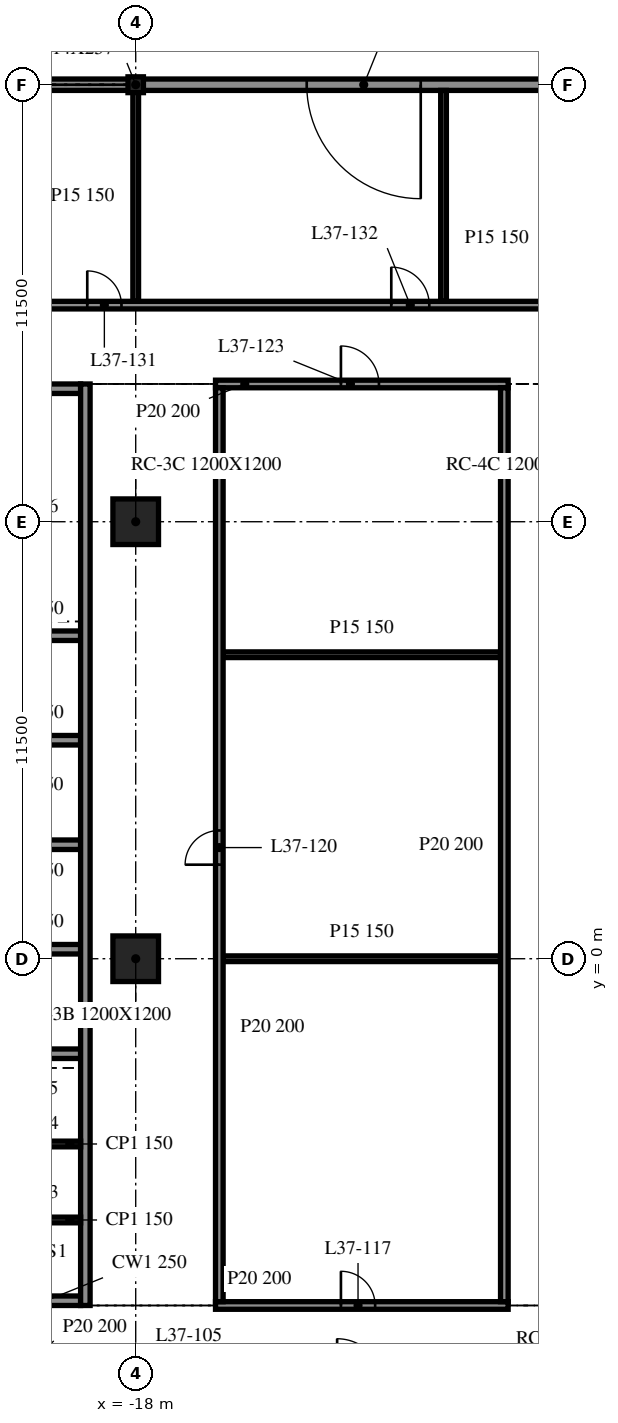
"""IFC4 building model, lengths in metres.
Left out: names, types, materials, properties, quantities, classifications, styles, units other than length and angle.
Written with IfcOpenShell. Run it as: python <this file> out.ifc"""

import sys

from ifc_helpers import new_model, si_unit, direction, frame, frame_2d, origin, origin_2d, place, context, subcontext, project, spatial, rectangle, i_section, extrude, element, fill, save


model = new_model("IFC4")
c1 = context("Model", 3, precision=1e-05, world=origin(), true_north=direction((0.0, 1.0)))
c2 = subcontext(c1, "Body", "Model", "MODEL_VIEW")
j1 = project(units=[si_unit("LENGTHUNIT", "METRE"), si_unit("PLANEANGLEUNIT", "RADIAN")], contexts=[c1])
p1 = place(None, origin())
s1 = spatial("IfcSite", under=j1, at=p1, CompositionType="ELEMENT")
p2 = place(p1, origin())
s2 = spatial("IfcBuilding", under=s1, at=p2, CompositionType="ELEMENT")
p3 = place(p2, frame((0.0, 0.0, 159.2)))
s3 = spatial("IfcBuildingStorey", under=s2, at=p3, CompositionType="ELEMENT", Elevation=159.2)
for number, where, z_axis, x_axis in (
    (1, (-18.0, 0.0, -0.34), (0.0, 0.0, 1.0), (1.0, 0.0, 0.0)),
    (2, (-18.0, 11.5, -0.34), (0.0, 0.0, 1.0), (1.0, 0.0, 0.0)),
):
    element("IfcColumn", number, at=place(p3, frame(where, z_axis=z_axis, x_axis=x_axis)), inside=s3, PredefinedType="COLUMN", context=c2, shape_type="SweptSolid", body=[
        extrude(rectangle(XDim=1.2, YDim=1.2, at=origin_2d()), origin(), (0.0, 0.0, 1.0), 3.8),
    ])
p4 = place(p3, frame((-18.0, 23.0, -0.34), z_axis=(0.0, 0.0, 1.0), x_axis=(1.0, 0.0, 0.0)))
e3 = element("IfcColumn", 3, at=p4, inside=s3, PredefinedType="COLUMN", context=c2, shape_type="SweptSolid", body=[
    extrude(i_section(OverallWidth=0.406, OverallDepth=0.417, WebThickness=0.03, FlangeThickness=0.048, at=origin_2d()), origin(), (0.0, 0.0, 1.0), 3.8),
])
p5 = place(p3, frame((-6.015, 23.0, 0.0), z_axis=(0.0, 0.0, 1.0), x_axis=(-1.0, 0.0, 0.0)))
e4 = element("IfcWall", 4, at=p5, inside=s3, PredefinedType="NOTDEFINED", context=c2, shape_type="SweptSolid", body=[
    extrude(rectangle(XDim=11.97, YDim=0.3, at=frame_2d((5.985, 0.0))), origin(), (0.0, 0.0, 1.0), 2.782),
])
p6 = place(p5, frame((4.485, 0.0, 0.0)))
e5 = element("IfcOpeningElement", 5, at=p6, cuts=e4, PredefinedType="OPENING", context=c2, shape_type="SweptSolid", body=[
    extrude(rectangle(XDim=3.0, YDim=2.4, at=frame_2d((1.5, 1.2))), frame((0.0, 0.16, 0.0), z_axis=(0.0, -1.0, 0.0), x_axis=(1.0, 0.0, 0.0)), (0.0, 0.0, 1.0), 0.32),
])
p7 = place(p3, frame((-18.015, 23.0, 0.0), z_axis=(0.0, 0.0, 1.0), x_axis=(-1.0, 0.0, 0.0)))
e6 = element("IfcWall", 6, at=p7, inside=s3, PredefinedType="NOTDEFINED", context=c2, shape_type="SweptSolid", body=[
    extrude(rectangle(XDim=11.97, YDim=0.3, at=frame_2d((5.985, 0.0))), origin(), (0.0, 0.0, 1.0), 2.782),
])
p8 = place(p3, frame((-19.325, -9.125, 0.0), z_axis=(0.0, 0.0, 1.0), x_axis=(0.0, 1.0, 0.0)))
e7 = element("IfcWall", 7, at=p8, inside=s3, PredefinedType="SOLIDWALL", context=c2, shape_type="SweptSolid", body=[
    extrude(rectangle(XDim=24.25, YDim=0.25, at=frame_2d((12.125, 0.0))), origin(), (0.0, 0.0, 1.0), 3.46),
])
p9 = place(p3, frame((-19.45, -9.0, 0.0), z_axis=(0.0, 0.0, 1.0), x_axis=(-1.0, 0.0, 0.0)))
e8 = element("IfcWall", 8, at=p9, inside=s3, PredefinedType="SOLIDWALL", context=c2, shape_type="SweptSolid", body=[
    extrude(rectangle(XDim=9.1, YDim=0.25, at=frame_2d((4.55, 0.0))), origin(), (0.0, 0.0, 1.0), 3.46),
])
p10 = place(p9, frame((3.65, 0.0, 0.0)))
e9 = element("IfcOpeningElement", 9, at=p10, cuts=e8, PredefinedType="OPENING", context=c2, shape_type="SweptSolid", body=[
    extrude(rectangle(XDim=1.8, YDim=2.1, at=frame_2d((0.9, 1.05))), frame((0.0, 0.135, 0.0), z_axis=(0.0, -1.0, 0.0), x_axis=(1.0, 0.0, 0.0)), (0.0, 0.0, 1.0), 0.27),
])
p11 = place(p3, frame((-28.55, 15.0, 0.0), z_axis=(0.0, 0.0, 1.0), x_axis=(1.0, 0.0, 0.0)))
e10 = element("IfcWall", 10, at=p11, inside=s3, PredefinedType="SOLIDWALL", context=c2, shape_type="SweptSolid", body=[
    extrude(rectangle(XDim=9.1, YDim=0.25, at=frame_2d((4.55, 0.0))), origin(), (0.0, 0.0, 1.0), 3.46),
])
p12 = place(p11, frame((3.65, 0.0, 0.0)))
e11 = element("IfcOpeningElement", 11, at=p12, cuts=e10, PredefinedType="OPENING", context=c2, shape_type="SweptSolid", body=[
    extrude(rectangle(XDim=1.8, YDim=2.1, at=frame_2d((0.9, 1.05))), frame((0.0, 0.135, 0.0), z_axis=(0.0, -1.0, 0.0), x_axis=(1.0, 0.0, 0.0)), (0.0, 0.0, 1.0), 0.27),
])
for number, where, z_axis, x_axis in (
    (12, (-22.3, -2.5, 0.0), (0.0, 0.0, 1.0), (1.0, 0.0, 0.0)),
    (13, (-22.3, 0.25, 0.0), (0.0, 0.0, 1.0), (1.0, 0.0, 0.0)),
    (14, (-22.3, 3.0, 0.0), (0.0, 0.0, 1.0), (1.0, 0.0, 0.0)),
    (15, (-22.3, 5.75, 0.0), (0.0, 0.0, 1.0), (1.0, 0.0, 0.0)),
    (16, (-22.3, 8.5, 0.0), (0.0, 0.0, 1.0), (1.0, 0.0, 0.0)),
):
    element("IfcWall", number, at=place(p3, frame(where, z_axis=z_axis, x_axis=x_axis)), inside=s3, PredefinedType="SOLIDWALL", context=c2, shape_type="SweptSolid", body=[
        extrude(rectangle(XDim=2.85, YDim=0.25, at=frame_2d((1.425, 0.0))), origin(), (0.0, 0.0, 1.0), 3.46),
    ])
for number, where, z_axis, x_axis in (
    (17, (-22.3, -6.875, 0.0), (0.0, 0.0, 1.0), (1.0, 0.0, 0.0)),
    (18, (-22.3, -4.875, 0.0), (0.0, 0.0, 1.0), (1.0, 0.0, 0.0)),
):
    element("IfcWall", number, at=place(p3, frame(where, z_axis=z_axis, x_axis=x_axis)), inside=s3, PredefinedType="PARTITIONING", context=c2, shape_type="SweptSolid", body=[
        extrude(rectangle(XDim=2.85, YDim=0.15, at=frame_2d((1.425, 0.0))), origin(), (0.0, 0.0, 1.0), 3.46),
    ])
p13 = place(p3, frame((-15.9, -9.125, 0.0), z_axis=(0.0, 0.0, 1.0), x_axis=(1.0, 0.0, 0.0)))
e19 = element("IfcWall", 19, at=p13, inside=s3, PredefinedType="PARTITIONING", context=c2, shape_type="SweptSolid", body=[
    extrude(rectangle(XDim=7.7, YDim=0.2, at=frame_2d((3.85, 0.0))), origin(), (0.0, 0.0, 1.0), 3.46),
])
p14 = place(p13, frame((3.3, 0.0, 0.0)))
e20 = element("IfcOpeningElement", 20, at=p14, cuts=e19, PredefinedType="OPENING", context=c2, shape_type="SweptSolid", body=[
    extrude(rectangle(XDim=0.9, YDim=2.1, at=frame_2d((0.45, 1.05))), frame((0.0, 0.11, 0.0), z_axis=(0.0, -1.0, 0.0), x_axis=(1.0, 0.0, 0.0)), (0.0, 0.0, 1.0), 0.22),
])
for number, where, z_axis, x_axis in (
    (21, (-15.7, 0.0, 0.0), (0.0, 0.0, 1.0), (1.0, 0.0, 0.0)),
    (22, (-15.7, 8.0, 0.0), (0.0, 0.0, 1.0), (1.0, 0.0, 0.0)),
):
    element("IfcWall", number, at=place(p3, frame(where, z_axis=z_axis, x_axis=x_axis)), inside=s3, PredefinedType="PARTITIONING", context=c2, shape_type="SweptSolid", body=[
        extrude(rectangle(XDim=7.3, YDim=0.15, at=frame_2d((3.65, 0.0))), origin(), (0.0, 0.0, 1.0), 3.46),
    ])
p15 = place(p3, frame((-15.9, 15.125, 0.0), z_axis=(0.0, 0.0, 1.0), x_axis=(1.0, 0.0, 0.0)))
e23 = element("IfcWall", 23, at=p15, inside=s3, PredefinedType="PARTITIONING", context=c2, shape_type="SweptSolid", body=[
    extrude(rectangle(XDim=7.7, YDim=0.2, at=frame_2d((3.85, 0.0))), origin(), (0.0, 0.0, 1.0), 3.46),
])
p16 = place(p15, frame((3.3, 0.0, 0.0)))
e24 = element("IfcOpeningElement", 24, at=p16, cuts=e23, PredefinedType="OPENING", context=c2, shape_type="SweptSolid", body=[
    extrude(rectangle(XDim=1.0, YDim=2.1, at=frame_2d((0.5, 1.05))), frame((0.0, 0.11, 0.0), z_axis=(0.0, -1.0, 0.0), x_axis=(1.0, 0.0, 0.0)), (0.0, 0.0, 1.0), 0.22),
])
p17 = place(p3, frame((-47.975, 17.2, 0.0), z_axis=(0.0, 0.0, 1.0), x_axis=(1.0, 0.0, 0.0)))
e25 = element("IfcWall", 25, at=p17, inside=s3, PredefinedType="PARTITIONING", context=c2, shape_type="SweptSolid", body=[
    extrude(rectangle(XDim=95.95, YDim=0.2, at=frame_2d((47.975, 0.0))), origin(), (0.0, 0.0, 1.0), 3.46),
])
p18 = place(p17, frame((4.5, 0.0, 0.0)))
e26 = element("IfcOpeningElement", 26, at=p18, cuts=e25, PredefinedType="OPENING", context=c2, shape_type="SweptSolid", body=[
    extrude(rectangle(XDim=1.0, YDim=2.1, at=frame_2d((0.5, 1.05))), frame((0.0, 0.11, 0.0), z_axis=(0.0, -1.0, 0.0), x_axis=(1.0, 0.0, 0.0)), (0.0, 0.0, 1.0), 0.22),
])
p19 = place(p17, frame((10.5, 0.0, 0.0)))
e27 = element("IfcOpeningElement", 27, at=p19, cuts=e25, PredefinedType="OPENING", context=c2, shape_type="SweptSolid", body=[
    extrude(rectangle(XDim=1.0, YDim=2.1, at=frame_2d((0.5, 1.05))), frame((0.0, 0.11, 0.0), z_axis=(0.0, -1.0, 0.0), x_axis=(1.0, 0.0, 0.0)), (0.0, 0.0, 1.0), 0.22),
])
p20 = place(p17, frame((22.7, 0.0, 0.0)))
e28 = element("IfcOpeningElement", 28, at=p20, cuts=e25, PredefinedType="OPENING", context=c2, shape_type="SweptSolid", body=[
    extrude(rectangle(XDim=0.9, YDim=2.1, at=frame_2d((0.45, 1.05))), frame((0.0, 0.11, 0.0), z_axis=(0.0, -1.0, 0.0), x_axis=(1.0, 0.0, 0.0)), (0.0, 0.0, 1.0), 0.22),
])
p21 = place(p17, frame((25.7, 0.0, 0.0)))
e29 = element("IfcOpeningElement", 29, at=p21, cuts=e25, PredefinedType="OPENING", context=c2, shape_type="SweptSolid", body=[
    extrude(rectangle(XDim=1.2, YDim=2.1, at=frame_2d((0.6, 1.05))), frame((0.0, 0.11, 0.0), z_axis=(0.0, -1.0, 0.0), x_axis=(1.0, 0.0, 0.0)), (0.0, 0.0, 1.0), 0.22),
])
p22 = place(p17, frame((28.7, 0.0, 0.0)))
e30 = element("IfcOpeningElement", 30, at=p22, cuts=e25, PredefinedType="OPENING", context=c2, shape_type="SweptSolid", body=[
    extrude(rectangle(XDim=0.9, YDim=2.1, at=frame_2d((0.45, 1.05))), frame((0.0, 0.11, 0.0), z_axis=(0.0, -1.0, 0.0), x_axis=(1.0, 0.0, 0.0)), (0.0, 0.0, 1.0), 0.22),
])
p23 = place(p17, frame((36.7, 0.0, 0.0)))
e31 = element("IfcOpeningElement", 31, at=p23, cuts=e25, PredefinedType="OPENING", context=c2, shape_type="SweptSolid", body=[
    extrude(rectangle(XDim=1.0, YDim=2.1, at=frame_2d((0.5, 1.05))), frame((0.0, 0.11, 0.0), z_axis=(0.0, -1.0, 0.0), x_axis=(1.0, 0.0, 0.0)), (0.0, 0.0, 1.0), 0.22),
])
p24 = place(p17, frame((46.5, 0.0, 0.0)))
e32 = element("IfcOpeningElement", 32, at=p24, cuts=e25, PredefinedType="OPENING", context=c2, shape_type="SweptSolid", body=[
    extrude(rectangle(XDim=1.0, YDim=2.1, at=frame_2d((0.5, 1.05))), frame((0.0, 0.11, 0.0), z_axis=(0.0, -1.0, 0.0), x_axis=(1.0, 0.0, 0.0)), (0.0, 0.0, 1.0), 0.22),
])
p25 = place(p17, frame((48.1, 0.0, 0.0)))
e33 = element("IfcOpeningElement", 33, at=p25, cuts=e25, PredefinedType="OPENING", context=c2, shape_type="SweptSolid", body=[
    extrude(rectangle(XDim=0.9, YDim=2.1, at=frame_2d((0.45, 1.05))), frame((0.0, 0.11, 0.0), z_axis=(0.0, -1.0, 0.0), x_axis=(1.0, 0.0, 0.0)), (0.0, 0.0, 1.0), 0.22),
])
p26 = place(p17, frame((51.5, 0.0, 0.0)))
e34 = element("IfcOpeningElement", 34, at=p26, cuts=e25, PredefinedType="OPENING", context=c2, shape_type="SweptSolid", body=[
    extrude(rectangle(XDim=1.2, YDim=2.1, at=frame_2d((0.6, 1.05))), frame((0.0, 0.11, 0.0), z_axis=(0.0, -1.0, 0.0), x_axis=(1.0, 0.0, 0.0)), (0.0, 0.0, 1.0), 0.22),
])
p27 = place(p17, frame((54.1, 0.0, 0.0)))
e35 = element("IfcOpeningElement", 35, at=p27, cuts=e25, PredefinedType="OPENING", context=c2, shape_type="SweptSolid", body=[
    extrude(rectangle(XDim=0.9, YDim=2.1, at=frame_2d((0.45, 1.05))), frame((0.0, 0.11, 0.0), z_axis=(0.0, -1.0, 0.0), x_axis=(1.0, 0.0, 0.0)), (0.0, 0.0, 1.0), 0.22),
])
p28 = place(p17, frame((62.3, 0.0, 0.0)))
e36 = element("IfcOpeningElement", 36, at=p28, cuts=e25, PredefinedType="OPENING", context=c2, shape_type="SweptSolid", body=[
    extrude(rectangle(XDim=1.0, YDim=2.1, at=frame_2d((0.5, 1.05))), frame((0.0, 0.11, 0.0), z_axis=(0.0, -1.0, 0.0), x_axis=(1.0, 0.0, 0.0)), (0.0, 0.0, 1.0), 0.22),
])
p29 = place(p17, frame((74.3, 0.0, 0.0)))
e37 = element("IfcOpeningElement", 37, at=p29, cuts=e25, PredefinedType="OPENING", context=c2, shape_type="SweptSolid", body=[
    extrude(rectangle(XDim=1.0, YDim=2.1, at=frame_2d((0.5, 1.05))), frame((0.0, 0.11, 0.0), z_axis=(0.0, -1.0, 0.0), x_axis=(1.0, 0.0, 0.0)), (0.0, 0.0, 1.0), 0.22),
])
p30 = place(p17, frame((78.1, 0.0, 0.0)))
e38 = element("IfcOpeningElement", 38, at=p30, cuts=e25, PredefinedType="OPENING", context=c2, shape_type="SweptSolid", body=[
    extrude(rectangle(XDim=0.9, YDim=2.1, at=frame_2d((0.45, 1.05))), frame((0.0, 0.11, 0.0), z_axis=(0.0, -1.0, 0.0), x_axis=(1.0, 0.0, 0.0)), (0.0, 0.0, 1.0), 0.22),
])
p31 = place(p17, frame((84.1, 0.0, 0.0)))
e39 = element("IfcOpeningElement", 39, at=p31, cuts=e25, PredefinedType="OPENING", context=c2, shape_type="SweptSolid", body=[
    extrude(rectangle(XDim=1.2, YDim=2.1, at=frame_2d((0.6, 1.05))), frame((0.0, 0.11, 0.0), z_axis=(0.0, -1.0, 0.0), x_axis=(1.0, 0.0, 0.0)), (0.0, 0.0, 1.0), 0.22),
])
p32 = place(p3, frame((-18.0, 17.3, 0.0), z_axis=(0.0, 0.0, 1.0), x_axis=(0.0, 1.0, 0.0)))
e40 = element("IfcWall", 40, at=p32, inside=s3, PredefinedType="PARTITIONING", context=c2, shape_type="SweptSolid", body=[
    extrude(rectangle(XDim=5.55, YDim=0.15, at=frame_2d((2.775, 0.0))), origin(), (0.0, 0.0, 1.0), 3.46),
])
p33 = place(p3, frame((-15.8, -9.025, 0.0), z_axis=(0.0, 0.0, 1.0), x_axis=(0.0, 1.0, 0.0)))
e41 = element("IfcWall", 41, at=p33, inside=s3, PredefinedType="PARTITIONING", context=c2, shape_type="SweptSolid", body=[
    extrude(rectangle(XDim=24.05, YDim=0.2, at=frame_2d((12.025, 0.0))), origin(), (0.0, 0.0, 1.0), 3.46),
])
p34 = place(p33, frame((11.5, 0.0, 0.0)))
e42 = element("IfcOpeningElement", 42, at=p34, cuts=e41, PredefinedType="OPENING", context=c2, shape_type="SweptSolid", body=[
    extrude(rectangle(XDim=0.9, YDim=2.1, at=frame_2d((0.45, 1.05))), frame((0.0, 0.11, 0.0), z_axis=(0.0, -1.0, 0.0), x_axis=(1.0, 0.0, 0.0)), (0.0, 0.0, 1.0), 0.22),
])
p35 = place(p3, frame((-9.9, 17.3, 0.0), z_axis=(0.0, 0.0, 1.0), x_axis=(0.0, 1.0, 0.0)))
e43 = element("IfcWall", 43, at=p35, inside=s3, PredefinedType="PARTITIONING", context=c2, shape_type="SweptSolid", body=[
    extrude(rectangle(XDim=5.55, YDim=0.15, at=frame_2d((2.775, 0.0))), origin(), (0.0, 0.0, 1.0), 3.46),
])
p36 = place(p3, frame((-8.3, -9.025, 0.0), z_axis=(0.0, 0.0, 1.0), x_axis=(0.0, 1.0, 0.0)))
e44 = element("IfcWall", 44, at=p36, inside=s3, PredefinedType="PARTITIONING", context=c2, shape_type="SweptSolid", body=[
    extrude(rectangle(XDim=24.05, YDim=0.2, at=frame_2d((12.025, 0.0))), origin(), (0.0, 0.0, 1.0), 3.46),
])
p37 = place(p6, origin())
e45 = element("IfcDoor", 45, at=p37, inside=s3, OperationType="SINGLE_SWING_LEFT", PredefinedType="DOOR", context=c2, shape_type="SweptSolid", body=[
    extrude(rectangle(XDim=3.0, YDim=2.4, at=frame_2d((1.5, 1.2))), frame((0.0, 0.025, 0.0), z_axis=(0.0, -1.0, 0.0), x_axis=(1.0, 0.0, 0.0)), (0.0, 0.0, 1.0), 0.05),
])
fill(e5, e45)
p38 = place(p14, origin())
e46 = element("IfcDoor", 46, at=p38, inside=s3, OperationType="SINGLE_SWING_LEFT", PredefinedType="DOOR", context=c2, shape_type="SweptSolid", body=[
    extrude(rectangle(XDim=0.9, YDim=2.1, at=frame_2d((0.45, 1.05))), frame((0.0, 0.025, 0.0), z_axis=(0.0, -1.0, 0.0), x_axis=(1.0, 0.0, 0.0)), (0.0, 0.0, 1.0), 0.05),
])
fill(e20, e46)
p39 = place(p34, origin())
e47 = element("IfcDoor", 47, at=p39, inside=s3, OperationType="SINGLE_SWING_RIGHT", PredefinedType="DOOR", context=c2, shape_type="SweptSolid", body=[
    extrude(rectangle(XDim=0.9, YDim=2.1, at=frame_2d((0.45, 1.05))), frame((0.0, 0.025, 0.0), z_axis=(0.0, -1.0, 0.0), x_axis=(1.0, 0.0, 0.0)), (0.0, 0.0, 1.0), 0.05),
])
fill(e42, e47)
p40 = place(p16, origin())
e48 = element("IfcDoor", 48, at=p40, inside=s3, OperationType="SINGLE_SWING_RIGHT", PredefinedType="DOOR", context=c2, shape_type="SweptSolid", body=[
    extrude(rectangle(XDim=1.0, YDim=2.1, at=frame_2d((0.5, 1.05))), frame((0.0, 0.025, 0.0), z_axis=(0.0, -1.0, 0.0), x_axis=(1.0, 0.0, 0.0)), (0.0, 0.0, 1.0), 0.05),
])
fill(e24, e48)
p41 = place(p22, origin())
e49 = element("IfcDoor", 49, at=p41, inside=s3, OperationType="SINGLE_SWING_LEFT", PredefinedType="DOOR", context=c2, shape_type="SweptSolid", body=[
    extrude(rectangle(XDim=0.9, YDim=2.1, at=frame_2d((0.45, 1.05))), frame((0.0, 0.025, 0.0), z_axis=(0.0, -1.0, 0.0), x_axis=(1.0, 0.0, 0.0)), (0.0, 0.0, 1.0), 0.05),
])
fill(e30, e49)
p42 = place(p23, origin())
e50 = element("IfcDoor", 50, at=p42, inside=s3, OperationType="SINGLE_SWING_LEFT", PredefinedType="DOOR", context=c2, shape_type="SweptSolid", body=[
    extrude(rectangle(XDim=1.0, YDim=2.1, at=frame_2d((0.5, 1.05))), frame((0.0, 0.025, 0.0), z_axis=(0.0, -1.0, 0.0), x_axis=(1.0, 0.0, 0.0)), (0.0, 0.0, 1.0), 0.05),
])
fill(e31, e50)
save(model, sys.argv[1])
